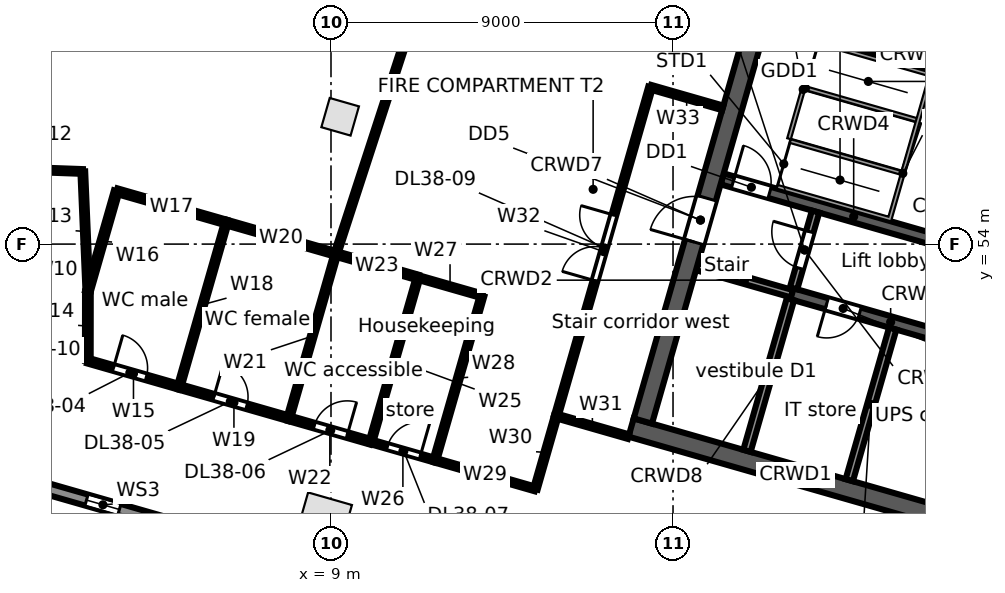
"""IFC4 building model, lengths in metres.
Left out: names, types, materials, properties, quantities, classifications, styles, units other than length and angle.
Written with IfcOpenShell. Run it as: python <this file> out.ifc"""

import sys

from ifc_helpers import new_model, si_unit, direction, frame, frame_2d, origin, origin_2d, place, context, subcontext, project, spatial, rectangle, extrude, element, fill, save


model = new_model("IFC4")
c1 = context("Model", 3, precision=1e-05, world=origin(), true_north=direction((0.0, 1.0)))
c2 = subcontext(c1, "Body", "Model", "MODEL_VIEW")
j1 = project(units=[si_unit("LENGTHUNIT", "METRE"), si_unit("PLANEANGLEUNIT", "RADIAN")], contexts=[c1])
p1 = place(None, origin())
s1 = spatial("IfcSite", under=j1, at=p1, CompositionType="ELEMENT")
p2 = place(p1, origin())
s2 = spatial("IfcBuilding", under=s1, at=p2, CompositionType="ELEMENT")
p3 = place(p2, frame((0.0, 0.0, 178.9)))
s3 = spatial("IfcBuildingStorey", under=s2, at=p3, CompositionType="ELEMENT", Elevation=178.9)
p4 = place(p3, frame((8.81, 46.722, 0.0), z_axis=(0.0, 0.0, 1.0), x_axis=(0.961261695938, -0.275637355817, 0.0)))
e1 = element("IfcColumn", 1, at=p4, inside=s3, PredefinedType="COLUMN", context=c2, shape_type="SweptSolid", body=[
    extrude(rectangle(XDim=1.2, YDim=1.2, at=origin_2d()), origin(), (0.0, 0.0, 1.0), 4.0),
])
p5 = place(p3, frame((9.241, 57.35, 0.0), z_axis=(0.0, 0.0, 1.0), x_axis=(0.961261695938, -0.275637355817, 0.0)))
e2 = element("IfcColumn", 2, at=p5, inside=s3, PredefinedType="COLUMN", context=c2, shape_type="SweptSolid", body=[
    extrude(rectangle(XDim=0.8, YDim=0.8, at=origin_2d()), origin(), (0.0, 0.0, 1.0), 4.0),
])
p6 = place(p3, frame((24.042, 41.106, 0.0), z_axis=(0.0, 0.0, 1.0), x_axis=(-0.961261693976, 0.275637362661, 0.0)))
e3 = element("IfcWall", 3, at=p6, inside=s3, PredefinedType="STANDARD", context=c2, shape_type="SweptSolid", body=[
    extrude(rectangle(XDim=24.948, YDim=0.3, at=frame_2d((12.474, 0.0))), origin(), (0.0, 0.0, 1.0), 3.68),
])
p7 = place(p6, frame((21.441, 0.0, 0.6)))
e4 = element("IfcOpeningElement", 4, at=p7, cuts=e3, PredefinedType="OPENING", context=c2, shape_type="SweptSolid", body=[
    extrude(rectangle(XDim=0.9, YDim=2.4, at=frame_2d((0.45, 1.2))), frame((0.0, 0.16, 0.0), z_axis=(0.0, -1.0, 0.0), x_axis=(1.0, 0.0, 0.0)), (0.0, 0.0, 1.0), 0.32),
])
p8 = place(p6, frame((13.121, 0.0, 0.6)))
e5 = element("IfcOpeningElement", 5, at=p8, cuts=e3, PredefinedType="OPENING", context=c2, shape_type="SweptSolid", body=[
    extrude(rectangle(XDim=0.9, YDim=2.4, at=frame_2d((0.45, 1.2))), frame((0.0, 0.16, 0.0), z_axis=(0.0, -1.0, 0.0), x_axis=(1.0, 0.0, 0.0)), (0.0, 0.0, 1.0), 0.32),
])
p9 = place(p6, frame((10.591, 0.0, 0.0)))
e6 = element("IfcOpeningElement", 6, at=p9, cuts=e3, PredefinedType="OPENING", context=c2, shape_type="SweptSolid", body=[
    extrude(rectangle(XDim=1.8, YDim=2.4, at=frame_2d((0.9, 1.2))), frame((0.0, 0.16, 0.0), z_axis=(0.0, -1.0, 0.0), x_axis=(1.0, 0.0, 0.0)), (0.0, 0.0, 1.0), 0.32),
])
p10 = place(p6, frame((4.8, 0.0, 0.6)))
e7 = element("IfcOpeningElement", 7, at=p10, cuts=e3, PredefinedType="OPENING", context=c2, shape_type="SweptSolid", body=[
    extrude(rectangle(XDim=0.9, YDim=2.4, at=frame_2d((0.45, 1.2))), frame((0.0, 0.16, 0.0), z_axis=(0.0, -1.0, 0.0), x_axis=(1.0, 0.0, 0.0)), (0.0, 0.0, 1.0), 0.32),
])
p11 = place(p6, frame((2.27, 0.0, 0.0)))
e8 = element("IfcOpeningElement", 8, at=p11, cuts=e3, PredefinedType="OPENING", context=c2, shape_type="SweptSolid", body=[
    extrude(rectangle(XDim=1.8, YDim=2.4, at=frame_2d((0.9, 1.2))), frame((0.0, 0.16, 0.0), z_axis=(0.0, -1.0, 0.0), x_axis=(1.0, 0.0, 0.0)), (0.0, 0.0, 1.0), 0.32),
])
p12 = place(p3, frame((16.897, 49.173, 0.0), z_axis=(0.0, 0.0, 1.0), x_axis=(0.96126248289, -0.275634611374, 0.0)))
e9 = element("IfcWall", 9, at=p12, inside=s3, PredefinedType="SOLIDWALL", context=c2, shape_type="SweptSolid", body=[
    extrude(rectangle(XDim=9.0, YDim=0.5, at=frame_2d((4.5, 0.0))), origin(), (0.0, 0.0, 1.0), 3.68),
])
p13 = place(p3, frame((18.632, 53.409, 0.0), z_axis=(0.0, 0.0, 1.0), x_axis=(0.961247078216, -0.275688328772, 0.0)))
e10 = element("IfcWall", 10, at=p13, inside=s3, PredefinedType="SOLIDWALL", context=c2, shape_type="SweptSolid", body=[
    extrude(rectangle(XDim=2.6, YDim=0.2, at=frame_2d((1.3, 0.0))), origin(), (0.0, 0.0, 1.0), 3.68),
])
p14 = place(p3, frame((21.131, 52.692, 0.0), z_axis=(0.0, 0.0, 1.0), x_axis=(0.961271043721, -0.27560475414, 0.0)))
e11 = element("IfcWall", 11, at=p14, inside=s3, PredefinedType="SOLIDWALL", context=c2, shape_type="SweptSolid", body=[
    extrude(rectangle(XDim=5.4, YDim=0.3, at=frame_2d((2.7, 0.0))), origin(), (0.0, 0.0, 1.0), 3.68),
])
p15 = place(p14, frame((0.95, 0.0, 0.0)))
e12 = element("IfcOpeningElement", 12, at=p15, cuts=e11, PredefinedType="OPENING", context=c2, shape_type="SweptSolid", body=[
    extrude(rectangle(XDim=0.9, YDim=2.1, at=frame_2d((0.45, 1.05))), frame((0.0, 0.16, 0.0), z_axis=(0.0, -1.0, 0.0), x_axis=(1.0, 0.0, 0.0)), (0.0, 0.0, 1.0), 0.32),
])
p16 = place(p14, frame((3.75, 0.0, 0.0)))
e13 = element("IfcOpeningElement", 13, at=p16, cuts=e11, PredefinedType="OPENING", context=c2, shape_type="SweptSolid", body=[
    extrude(rectangle(XDim=0.9, YDim=2.1, at=frame_2d((0.45, 1.05))), frame((0.0, 0.16, 0.0), z_axis=(0.0, -1.0, 0.0), x_axis=(1.0, 0.0, 0.0)), (0.0, 0.0, 1.0), 0.32),
])
p17 = place(p3, frame((19.293, 55.716, 0.0), z_axis=(0.0, 0.0, 1.0), x_axis=(0.96125862491, -0.275648065539, 0.0)))
e14 = element("IfcWall", 14, at=p17, inside=s3, PredefinedType="SOLIDWALL", context=c2, shape_type="SweptSolid", body=[
    extrude(rectangle(XDim=7.2, YDim=0.3, at=frame_2d((3.6, 0.0))), origin(), (0.0, 0.0, 1.0), 3.68),
])
p18 = place(p17, frame((0.3, 0.0, 0.0)))
e15 = element("IfcOpeningElement", 15, at=p18, cuts=e14, PredefinedType="OPENING", context=c2, shape_type="SweptSolid", body=[
    extrude(rectangle(XDim=1.0, YDim=2.1, at=frame_2d((0.5, 1.05))), frame((0.0, 0.16, 0.0), z_axis=(0.0, -1.0, 0.0), x_axis=(1.0, 0.0, 0.0)), (0.0, 0.0, 1.0), 0.32),
])
p19 = place(p3, frame((20.067, 60.228, 0.0), z_axis=(0.0, 0.0, 1.0), x_axis=(0.96126248289, -0.275634611374, 0.0)))
e16 = element("IfcWall", 16, at=p19, inside=s3, PredefinedType="SOLIDWALL", context=c2, shape_type="SweptSolid", body=[
    extrude(rectangle(XDim=9.0, YDim=0.5, at=frame_2d((4.5, 0.0))), origin(), (0.0, 0.0, 1.0), 3.68),
])
p20 = place(p3, frame((17.206, 49.344, 0.0), z_axis=(0.0, 0.0, 1.0), x_axis=(0.275632651182, 0.961263044958, 0.0)))
e17 = element("IfcWall", 17, at=p20, inside=s3, PredefinedType="SOLIDWALL", context=c2, shape_type="SweptSolid", body=[
    extrude(rectangle(XDim=11.0, YDim=0.5, at=frame_2d((5.5, 0.0))), origin(), (0.0, 0.0, 1.0), 3.68),
])
p21 = place(p20, frame((4.9, 0.0, 0.0)))
e18 = element("IfcOpeningElement", 18, at=p21, cuts=e17, PredefinedType="OPENING", context=c2, shape_type="SweptSolid", body=[
    extrude(rectangle(XDim=1.2, YDim=2.1, at=frame_2d((0.6, 1.05))), frame((0.0, 0.26, 0.0), z_axis=(0.0, -1.0, 0.0), x_axis=(1.0, 0.0, 0.0)), (0.0, 0.0, 1.0), 0.52),
])
p22 = place(p3, frame((19.946, 48.559, 0.0), z_axis=(0.0, 0.0, 1.0), x_axis=(0.275668905258, 0.961252648721, 0.0)))
e19 = element("IfcWall", 19, at=p22, inside=s3, PredefinedType="SOLIDWALL", context=c2, shape_type="SweptSolid", body=[
    extrude(rectangle(XDim=4.15, YDim=0.2, at=frame_2d((2.075, 0.0))), origin(), (0.0, 0.0, 1.0), 3.68),
])
p23 = place(p3, frame((21.172, 52.837, 0.0), z_axis=(0.0, 0.0, 1.0), x_axis=(0.275657676022, 0.961255868981, 0.0)))
e20 = element("IfcWall", 20, at=p23, inside=s3, PredefinedType="PARTITIONING", context=c2, shape_type="SweptSolid", body=[
    extrude(rectangle(XDim=2.1, YDim=0.2, at=frame_2d((1.05, 0.0))), origin(), (0.0, 0.0, 1.0), 3.68),
])
p24 = place(p23, frame((0.55, 0.0, 0.0)))
e21 = element("IfcOpeningElement", 21, at=p24, cuts=e20, PredefinedType="OPENING", context=c2, shape_type="SweptSolid", body=[
    extrude(rectangle(XDim=1.0, YDim=2.1, at=frame_2d((0.5, 1.05))), frame((0.0, 0.11, 0.0), z_axis=(0.0, -1.0, 0.0), x_axis=(1.0, 0.0, 0.0)), (0.0, 0.0, 1.0), 0.22),
])
p25 = place(p3, frame((22.637, 47.787, 0.0), z_axis=(0.0, 0.0, 1.0), x_axis=(0.275614546295, 0.961268236171, 0.0)))
e22 = element("IfcWall", 22, at=p25, inside=s3, PredefinedType="PARTITIONING", context=c2, shape_type="SweptSolid", body=[
    extrude(rectangle(XDim=4.15, YDim=0.2, at=frame_2d((2.075, 0.0))), origin(), (0.0, 0.0, 1.0), 3.68),
])
p26 = place(p3, frame((0.0, 56.0, 0.0), z_axis=(0.0, 0.0, 1.0), x_axis=(0.999349313684, -0.036068673934, 0.0)))
e23 = element("IfcWall", 23, at=p26, inside=s3, PredefinedType="PARTITIONING", context=c2, shape_type="SweptSolid", body=[
    extrude(rectangle(XDim=2.471, YDim=0.125, at=frame_2d((1.235, 0.0))), origin(), (0.0, 0.0, 1.0), 3.68),
])
p27 = place(p26, frame((0.7, 0.0, 0.0)))
e24 = element("IfcOpeningElement", 24, at=p27, cuts=e23, PredefinedType="OPENING", context=c2, shape_type="SweptSolid", body=[
    extrude(rectangle(XDim=0.9, YDim=2.1, at=frame_2d((0.45, 1.05))), frame((0.0, 0.073, 0.0), z_axis=(0.0, -1.0, 0.0), x_axis=(1.0, 0.0, 0.0)), (0.0, 0.0, 1.0), 0.145),
])
p28 = place(p3, frame((2.469, 55.911, 0.0), z_axis=(0.0, 0.0, 1.0), x_axis=(0.042391721597, -0.99910106693, 0.0)))
e25 = element("IfcWall", 25, at=p28, inside=s3, PredefinedType="PARTITIONING", context=c2, shape_type="SweptSolid", body=[
    extrude(rectangle(XDim=3.162, YDim=0.125, at=frame_2d((1.581, 0.0))), origin(), (0.0, 0.0, 1.0), 3.68),
])
p29 = place(p3, frame((2.601, 50.932, 0.0), z_axis=(0.0, 0.0, 1.0), x_axis=(0.001073104681, 0.999999424223, 0.0)))
e26 = element("IfcWall", 26, at=p29, inside=s3, PredefinedType="PARTITIONING", context=c2, shape_type="SweptSolid", body=[
    extrude(rectangle(XDim=1.82, YDim=0.15, at=frame_2d((0.91, 0.0))), origin(), (0.0, 0.0, 1.0), 3.68),
])
p30 = place(p3, frame((2.601, 50.932, 0.0), z_axis=(0.0, 0.0, 1.0), x_axis=(0.961265528111, -0.275623991092, 0.0)))
e27 = element("IfcWall", 27, at=p30, inside=s3, PredefinedType="PARTITIONING", context=c2, shape_type="SweptSolid", body=[
    extrude(rectangle(XDim=2.5, YDim=0.15, at=frame_2d((1.25, 0.0))), origin(), (0.0, 0.0, 1.0), 3.68),
])
p31 = place(p30, frame((0.7, 0.0, 0.0)))
e28 = element("IfcOpeningElement", 28, at=p31, cuts=e27, PredefinedType="OPENING", context=c2, shape_type="SweptSolid", body=[
    extrude(rectangle(XDim=0.9, YDim=2.1, at=frame_2d((0.45, 1.05))), frame((0.0, 0.085, 0.0), z_axis=(0.0, -1.0, 0.0), x_axis=(1.0, 0.0, 0.0)), (0.0, 0.0, 1.0), 0.17),
])
p32 = place(p3, frame((2.603, 52.752, 0.0), z_axis=(0.0, 0.0, 1.0), x_axis=(0.27569433145, 0.961245356611, 0.0)))
e29 = element("IfcWall", 29, at=p32, inside=s3, PredefinedType="PARTITIONING", context=c2, shape_type="SweptSolid", body=[
    extrude(rectangle(XDim=2.75, YDim=0.15, at=frame_2d((1.375, 0.0))), origin(), (0.0, 0.0, 1.0), 3.68),
])
p33 = place(p3, frame((3.361, 55.395, 0.0), z_axis=(0.0, 0.0, 1.0), x_axis=(0.961268664977, -0.27561305073, 0.0)))
e30 = element("IfcWall", 30, at=p33, inside=s3, PredefinedType="PARTITIONING", context=c2, shape_type="SweptSolid", body=[
    extrude(rectangle(XDim=3.0, YDim=0.15, at=frame_2d((1.5, 0.0))), origin(), (0.0, 0.0, 1.0), 3.68),
])
p34 = place(p3, frame((5.004, 50.243, 0.0), z_axis=(0.0, 0.0, 1.0), x_axis=(0.275838825927, 0.961203902464, 0.0)))
e31 = element("IfcWall", 31, at=p34, inside=s3, PredefinedType="PARTITIONING", context=c2, shape_type="SweptSolid", body=[
    extrude(rectangle(XDim=4.5, YDim=0.125, at=frame_2d((2.25, 0.0))), origin(), (0.0, 0.0, 1.0), 3.68),
])
p35 = place(p3, frame((5.004, 50.243, 0.0), z_axis=(0.0, 0.0, 1.0), x_axis=(0.961268664977, -0.27561305073, 0.0)))
e32 = element("IfcWall", 32, at=p35, inside=s3, PredefinedType="PARTITIONING", context=c2, shape_type="SweptSolid", body=[
    extrude(rectangle(XDim=3.0, YDim=0.15, at=frame_2d((1.5, 0.0))), origin(), (0.0, 0.0, 1.0), 3.68),
])
p36 = place(p35, frame((0.95, 0.0, 0.0)))
e33 = element("IfcOpeningElement", 33, at=p36, cuts=e32, PredefinedType="OPENING", context=c2, shape_type="SweptSolid", body=[
    extrude(rectangle(XDim=0.9, YDim=2.1, at=frame_2d((0.45, 1.05))), frame((0.0, 0.085, 0.0), z_axis=(0.0, -1.0, 0.0), x_axis=(1.0, 0.0, 0.0)), (0.0, 0.0, 1.0), 0.17),
])
p37 = place(p3, frame((6.245, 54.568, 0.0), z_axis=(0.0, 0.0, 1.0), x_axis=(0.961240918172, -0.275709806194, 0.0)))
e34 = element("IfcWall", 34, at=p37, inside=s3, PredefinedType="PARTITIONING", context=c2, shape_type="SweptSolid", body=[
    extrude(rectangle(XDim=3.0, YDim=0.15, at=frame_2d((1.5, 0.0))), origin(), (0.0, 0.0, 1.0), 2.852),
])
p38 = place(p3, frame((7.888, 49.416, 0.0), z_axis=(0.0, 0.0, 1.0), x_axis=(0.275803080638, 0.96121415965, 0.0)))
e35 = element("IfcWall", 35, at=p38, inside=s3, PredefinedType="PARTITIONING", context=c2, shape_type="SweptSolid", body=[
    extrude(rectangle(XDim=4.5, YDim=0.125, at=frame_2d((2.25, 0.0))), origin(), (0.0, 0.0, 1.0), 2.852),
])
p39 = place(p3, frame((7.888, 49.416, 0.0), z_axis=(0.0, 0.0, 1.0), x_axis=(0.9611628742, -0.275981755301, 0.0)))
e36 = element("IfcWall", 36, at=p39, inside=s3, PredefinedType="PARTITIONING", context=c2, shape_type="SweptSolid", body=[
    extrude(rectangle(XDim=2.25, YDim=0.15, at=frame_2d((1.125, 0.0))), origin(), (0.0, 0.0, 1.0), 2.748),
])
p40 = place(p39, frame((0.7, 0.0, 0.0)))
e37 = element("IfcOpeningElement", 37, at=p40, cuts=e36, PredefinedType="OPENING", context=c2, shape_type="SweptSolid", body=[
    extrude(rectangle(XDim=0.9, YDim=2.1, at=frame_2d((0.45, 1.05))), frame((0.0, 0.085, 0.0), z_axis=(0.0, -1.0, 0.0), x_axis=(1.0, 0.0, 0.0)), (0.0, 0.0, 1.0), 0.17),
])
p41 = place(p3, frame((9.129, 53.741, 0.0), z_axis=(0.0, 0.0, 1.0), x_axis=(0.961273691875, -0.275595517578, 0.0)))
e38 = element("IfcWall", 38, at=p41, inside=s3, PredefinedType="PARTITIONING", context=c2, shape_type="SweptSolid", body=[
    extrude(rectangle(XDim=2.249, YDim=0.15, at=frame_2d((1.125, 0.0))), origin(), (0.0, 0.0, 1.0), 2.748),
])
p42 = place(p3, frame((9.129, 53.741, 0.0), z_axis=(0.0, 0.0, 1.0), x_axis=(0.309576741849, 0.950874461171, 0.0)))
e39 = element("IfcWall", 39, at=p42, inside=s3, PredefinedType="PARTITIONING", context=c2, shape_type="SweptSolid", body=[
    extrude(rectangle(XDim=14.895, YDim=0.125, at=frame_2d((7.447, 0.0))), origin(), (0.0, 0.0, 1.0), 2.748),
])
p43 = place(p3, frame((10.051, 48.795, 0.0), z_axis=(0.0, 0.0, 1.0), x_axis=(0.275530671241, 0.961292280841, 0.0)))
e40 = element("IfcWall", 40, at=p43, inside=s3, PredefinedType="PARTITIONING", context=c2, shape_type="SweptSolid", body=[
    extrude(rectangle(XDim=4.5, YDim=0.125, at=frame_2d((2.25, 0.0))), origin(), (0.0, 0.0, 1.0), 3.68),
])
p44 = place(p3, frame((10.051, 48.795, 0.0), z_axis=(0.0, 0.0, 1.0), x_axis=(0.961313033798, -0.275458256455, 0.0)))
e41 = element("IfcWall", 41, at=p44, inside=s3, PredefinedType="PARTITIONING", context=c2, shape_type="SweptSolid", body=[
    extrude(rectangle(XDim=1.75, YDim=0.125, at=frame_2d((0.875, 0.0))), origin(), (0.0, 0.0, 1.0), 3.68),
])
p45 = place(p44, frame((0.45, 0.0, 0.0)))
e42 = element("IfcOpeningElement", 42, at=p45, cuts=e41, PredefinedType="OPENING", context=c2, shape_type="SweptSolid", body=[
    extrude(rectangle(XDim=0.9, YDim=2.1, at=frame_2d((0.45, 1.05))), frame((0.0, 0.073, 0.0), z_axis=(0.0, -1.0, 0.0), x_axis=(1.0, 0.0, 0.0)), (0.0, 0.0, 1.0), 0.145),
])
p46 = place(p3, frame((11.291, 53.121, 0.0), z_axis=(0.0, 0.0, 1.0), x_axis=(0.961329010357, -0.275402494264, 0.0)))
e43 = element("IfcWall", 43, at=p46, inside=s3, PredefinedType="PARTITIONING", context=c2, shape_type="SweptSolid", body=[
    extrude(rectangle(XDim=1.751, YDim=0.125, at=frame_2d((0.875, 0.0))), origin(), (0.0, 0.0, 1.0), 3.68),
])
p47 = place(p3, frame((11.733, 48.313, 0.0), z_axis=(0.0, 0.0, 1.0), x_axis=(0.275795676316, 0.961216284155, 0.0)))
e44 = element("IfcWall", 44, at=p47, inside=s3, PredefinedType="PARTITIONING", context=c2, shape_type="SweptSolid", body=[
    extrude(rectangle(XDim=4.5, YDim=0.125, at=frame_2d((2.25, 0.0))), origin(), (0.0, 0.0, 1.0), 3.68),
])
p48 = place(p3, frame((11.733, 48.313, 0.0), z_axis=(0.0, 0.0, 1.0), x_axis=(0.961272337704, -0.275600240865, 0.0)))
e45 = element("IfcWall", 45, at=p48, inside=s3, PredefinedType="PARTITIONING", context=c2, shape_type="SweptSolid", body=[
    extrude(rectangle(XDim=2.75, YDim=0.125, at=frame_2d((1.375, 0.0))), origin(), (0.0, 0.0, 1.0), 3.68),
])
p49 = place(p3, frame((14.377, 47.555, 0.0), z_axis=(0.0, 0.0, 1.0), x_axis=(0.275446387355, 0.961316434736, 0.0)))
e46 = element("IfcWall", 46, at=p49, inside=s3, PredefinedType="PARTITIONING", context=c2, shape_type="SweptSolid", body=[
    extrude(rectangle(XDim=2.0, YDim=0.125, at=frame_2d((1.0, 0.0))), origin(), (0.0, 0.0, 1.0), 3.68),
])
p50 = place(p3, frame((14.928, 49.478, 0.0), z_axis=(0.0, 0.0, 1.0), x_axis=(0.961243778232, -0.27569983462, 0.0)))
e47 = element("IfcWall", 47, at=p50, inside=s3, PredefinedType="PARTITIONING", context=c2, shape_type="SweptSolid", body=[
    extrude(rectangle(XDim=1.977, YDim=0.125, at=frame_2d((0.988, 0.0))), origin(), (0.0, 0.0, 1.0), 3.68),
])
p51 = place(p3, frame((14.928, 49.478, 0.0), z_axis=(0.0, 0.0, 1.0), x_axis=(0.275674053528, 0.961251172281, 0.0)))
e48 = element("IfcWall", 48, at=p51, inside=s3, PredefinedType="PARTITIONING", context=c2, shape_type="SweptSolid", body=[
    extrude(rectangle(XDim=9.0, YDim=0.125, at=frame_2d((4.5, 0.0))), origin(), (0.0, 0.0, 1.0), 2.748),
])
p52 = place(p51, frame((3.7, 0.0, 0.0)))
e49 = element("IfcOpeningElement", 49, at=p52, cuts=e48, PredefinedType="OPENING", context=c2, shape_type="SweptSolid", body=[
    extrude(rectangle(XDim=1.8, YDim=2.1, at=frame_2d((0.9, 1.05))), frame((0.0, 0.073, 0.0), z_axis=(0.0, -1.0, 0.0), x_axis=(1.0, 0.0, 0.0)), (0.0, 0.0, 1.0), 0.145),
])
p53 = place(p3, frame((17.409, 58.129, 0.0), z_axis=(0.0, 0.0, 1.0), x_axis=(0.961253165474, -0.275667103345, 0.0)))
e50 = element("IfcWall", 50, at=p53, inside=s3, PredefinedType="PARTITIONING", context=c2, shape_type="SweptSolid", body=[
    extrude(rectangle(XDim=1.977, YDim=0.125, at=frame_2d((0.988, 0.0))), origin(), (0.0, 0.0, 1.0), 3.68),
])
p54 = place(p7, origin())
e51 = element("IfcWindow", 51, at=p54, inside=s3, PartitioningType="SINGLE_PANEL", PredefinedType="WINDOW", context=c2, shape_type="SweptSolid", body=[
    extrude(rectangle(XDim=0.9, YDim=2.4, at=frame_2d((0.45, 1.2))), frame((0.0, 0.03, 0.0), z_axis=(0.0, -1.0, 0.0), x_axis=(1.0, 0.0, 0.0)), (0.0, 0.0, 1.0), 0.06),
])
fill(e4, e51)
p55 = place(p18, origin())
e52 = element("IfcDoor", 52, at=p55, inside=s3, OperationType="SINGLE_SWING_LEFT", PredefinedType="DOOR", context=c2, shape_type="SweptSolid", body=[
    extrude(rectangle(XDim=1.0, YDim=2.1, at=frame_2d((0.5, 1.05))), frame((0.0, 0.025, 0.0), z_axis=(0.0, -1.0, 0.0), x_axis=(1.0, 0.0, 0.0)), (0.0, 0.0, 1.0), 0.05),
])
fill(e15, e52)
p56 = place(p24, origin())
e53 = element("IfcDoor", 53, at=p56, inside=s3, OperationType="SINGLE_SWING_RIGHT", PredefinedType="DOOR", context=c2, shape_type="SweptSolid", body=[
    extrude(rectangle(XDim=1.0, YDim=2.1, at=frame_2d((0.5, 1.05))), frame((0.0, 0.025, 0.0), z_axis=(0.0, -1.0, 0.0), x_axis=(1.0, 0.0, 0.0)), (0.0, 0.0, 1.0), 0.05),
])
fill(e21, e53)
p57 = place(p21, origin())
e54 = element("IfcDoor", 54, at=p57, inside=s3, OperationType="SINGLE_SWING_LEFT", PredefinedType="DOOR", context=c2, shape_type="SweptSolid", body=[
    extrude(rectangle(XDim=1.2, YDim=2.1, at=frame_2d((0.6, 1.05))), frame((0.0, 0.025, 0.0), z_axis=(0.0, -1.0, 0.0), x_axis=(1.0, 0.0, 0.0)), (0.0, 0.0, 1.0), 0.05),
])
fill(e18, e54)
p58 = place(p15, frame((0.9, 0.0, 0.0), z_axis=(0.0, 0.0, 1.0), x_axis=(-1.0, 0.0, 0.0)))
e55 = element("IfcDoor", 55, at=p58, inside=s3, OperationType="SINGLE_SWING_RIGHT", PredefinedType="DOOR", context=c2, shape_type="SweptSolid", body=[
    extrude(rectangle(XDim=0.9, YDim=2.1, at=frame_2d((0.45, 1.05))), frame((0.0, 0.025, 0.0), z_axis=(0.0, -1.0, 0.0), x_axis=(1.0, 0.0, 0.0)), (0.0, 0.0, 1.0), 0.05),
])
fill(e12, e55)
p59 = place(p31, origin())
e56 = element("IfcDoor", 56, at=p59, inside=s3, OperationType="SINGLE_SWING_LEFT", PredefinedType="DOOR", context=c2, shape_type="SweptSolid", body=[
    extrude(rectangle(XDim=0.9, YDim=2.1, at=frame_2d((0.45, 1.05))), frame((0.0, 0.025, 0.0), z_axis=(0.0, -1.0, 0.0), x_axis=(1.0, 0.0, 0.0)), (0.0, 0.0, 1.0), 0.05),
])
fill(e28, e56)
p60 = place(p36, origin())
e57 = element("IfcDoor", 57, at=p60, inside=s3, OperationType="SINGLE_SWING_LEFT", PredefinedType="DOOR", context=c2, shape_type="SweptSolid", body=[
    extrude(rectangle(XDim=0.9, YDim=2.1, at=frame_2d((0.45, 1.05))), frame((0.0, 0.025, 0.0), z_axis=(0.0, -1.0, 0.0), x_axis=(1.0, 0.0, 0.0)), (0.0, 0.0, 1.0), 0.05),
])
fill(e33, e57)
p61 = place(p40, origin())
e58 = element("IfcDoor", 58, at=p61, inside=s3, OperationType="SINGLE_SWING_RIGHT", PredefinedType="DOOR", context=c2, shape_type="SweptSolid", body=[
    extrude(rectangle(XDim=0.9, YDim=2.1, at=frame_2d((0.45, 1.05))), frame((0.0, 0.025, 0.0), z_axis=(0.0, -1.0, 0.0), x_axis=(1.0, 0.0, 0.0)), (0.0, 0.0, 1.0), 0.05),
])
fill(e37, e58)
p62 = place(p45, origin())
e59 = element("IfcDoor", 59, at=p62, inside=s3, OperationType="SINGLE_SWING_RIGHT", PredefinedType="DOOR", context=c2, shape_type="SweptSolid", body=[
    extrude(rectangle(XDim=0.9, YDim=2.1, at=frame_2d((0.45, 1.05))), frame((0.0, 0.025, 0.0), z_axis=(0.0, -1.0, 0.0), x_axis=(1.0, 0.0, 0.0)), (0.0, 0.0, 1.0), 0.05),
])
fill(e42, e59)
p63 = place(p52, origin())
e60 = element("IfcDoor", 60, at=p63, inside=s3, OperationType="DOUBLE_DOOR_SINGLE_SWING", PredefinedType="DOOR", context=c2, shape_type="SweptSolid", body=[
    extrude(rectangle(XDim=1.8, YDim=2.1, at=frame_2d((0.9, 1.05))), frame((0.0, 0.025, 0.0), z_axis=(0.0, -1.0, 0.0), x_axis=(1.0, 0.0, 0.0)), (0.0, 0.0, 1.0), 0.05),
])
fill(e49, e60)
save(model, sys.argv[1])
